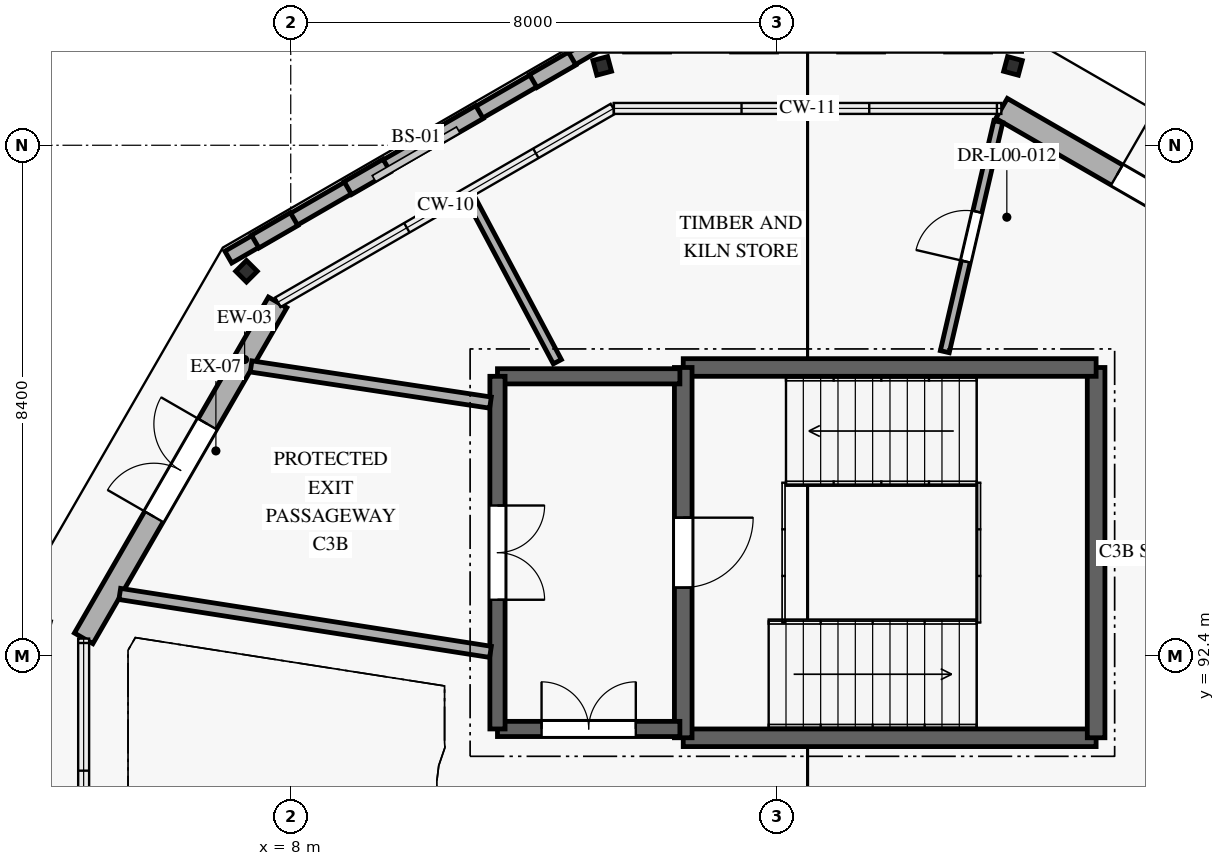
"""IFC4 building model, lengths in metres.
Left out: names, types, materials, properties, quantities, classifications, styles, units other than length and angle.
Written with IfcOpenShell. Run it as: python <this file> out.ifc"""

import sys

from ifc_helpers import new_model, si_unit, direction, frame, frame_2d, origin, origin_2d, place, context, subcontext, project, spatial, rectangle, hollow_rectangle, extrude, element, fill, save


model = new_model("IFC4")
c1 = context("Model", 3, precision=1e-05, world=origin(), true_north=direction((0.0, 1.0)))
c2 = subcontext(c1, "Body", "Model", "MODEL_VIEW")
j1 = project(units=[si_unit("LENGTHUNIT", "METRE"), si_unit("PLANEANGLEUNIT", "RADIAN")], contexts=[c1])
p1 = place(None, origin())
s1 = spatial("IfcSite", under=j1, at=p1, CompositionType="ELEMENT")
p2 = place(p1, origin())
s2 = spatial("IfcBuilding", under=s1, at=p2, CompositionType="ELEMENT")
p3 = place(p2, origin())
s3 = spatial("IfcBuildingStorey", under=s2, at=p3, CompositionType="ELEMENT", Elevation=0.0)
for number, where, z_axis, x_axis in (
    (1, (19.878, 102.105, 0.0), (0.0, 0.0, 1.0), (-0.966, 0.259, 0.0)),
    (2, (13.122, 102.105, 0.0), (0.0, 0.0, 1.0), (-0.966, -0.259, 0.0)),
    (3, (7.272, 98.728, 0.0), (0.0, 0.0, 1.0), (-0.707, -0.707, 0.0)),
):
    element("IfcColumn", number, at=place(p3, frame(where, z_axis=z_axis, x_axis=x_axis)), inside=s3, PredefinedType="COLUMN", context=c2, shape_type="SweptSolid", body=[
        extrude(hollow_rectangle(XDim=0.25, YDim=0.25, WallThickness=0.012, InnerFilletRadius=0.012, OuterFilletRadius=0.019, at=origin_2d()), origin(), (0.0, 0.0, 1.0), 4.2),
    ])
p4 = place(p3, frame((4.594, 92.69, 0.0), z_axis=(0.0, 0.0, 1.0), x_axis=(0.499966461314, 0.866044766488, 0.0)))
e4 = element("IfcWall", 4, at=p4, inside=s3, PredefinedType="SOLIDWALL", context=c2, shape_type="SweptSolid", body=[
    extrude(rectangle(XDim=6.38, YDim=0.35, at=frame_2d((3.19, 0.0))), origin(), (0.0, 0.0, 1.0), 3.94),
])
p5 = place(p4, frame((2.31, 0.0, 0.0)))
e5 = element("IfcOpeningElement", 5, at=p5, cuts=e4, PredefinedType="OPENING", context=c2, shape_type="SweptSolid", body=[
    extrude(rectangle(XDim=1.76, YDim=2.15, at=frame_2d((0.88, 1.075))), frame((0.0, 0.185, 0.0), z_axis=(0.0, -1.0, 0.0), x_axis=(1.0, 0.0, 0.0)), (0.0, 0.0, 1.0), 0.37),
])
p6 = place(p3, frame((19.69, 101.406, 0.0), z_axis=(0.0, 0.0, 1.0), x_axis=(0.866044766488, -0.499966461314, 0.0)))
e6 = element("IfcWall", 6, at=p6, inside=s3, PredefinedType="SOLIDWALL", context=c2, shape_type="SweptSolid", body=[
    extrude(rectangle(XDim=6.38, YDim=0.38, at=frame_2d((3.19, 0.0))), origin(), (0.0, 0.0, 1.0), 3.94),
])
p7 = place(p6, frame((2.19, 0.0, 0.0)))
e7 = element("IfcOpeningElement", 7, at=p7, cuts=e6, PredefinedType="OPENING", context=c2, shape_type="SweptSolid", body=[
    extrude(rectangle(XDim=2.0, YDim=2.2, at=frame_2d((1.0, 1.1))), frame((0.0, 0.2, 0.0), z_axis=(0.0, -1.0, 0.0), x_axis=(1.0, 0.0, 0.0)), (0.0, 0.0, 1.0), 0.4),
])
p8 = place(p3, frame((13.07, 102.481, 0.0), z_axis=(0.0, 0.0, 1.0), x_axis=(-0.866019260715, -0.500010639957, 0.0)))
e8 = element("IfcWall", 8, at=p8, inside=s3, PredefinedType="ELEMENTEDWALL", context=c2, shape_type="SweptSolid", body=[
    extrude(rectangle(XDim=7.04, YDim=0.225, at=frame_2d((3.52, 0.0))), origin(), (0.0, 0.0, 1.0), 0.55),
])
p9 = place(p3, frame((12.628, 102.226, 0.55), z_axis=(0.0, 0.0, 1.0), x_axis=(-0.865915952323, -0.500189527592, 0.0)))
e9 = element("IfcWall", 9, at=p9, inside=s3, PredefinedType="ELEMENTEDWALL", context=c2, shape_type="SweptSolid", body=[
    extrude(rectangle(XDim=0.739, YDim=0.245, at=frame_2d((0.37, 0.0))), origin(), (0.0, 0.0, 1.0), 3.39),
])
p10 = place(p3, frame((11.104, 101.345, 0.55), z_axis=(0.0, 0.0, 1.0), x_axis=(-0.866059033742, -0.499941746681, 0.0)))
e10 = element("IfcWall", 10, at=p10, inside=s3, PredefinedType="ELEMENTEDWALL", context=c2, shape_type="SweptSolid", body=[
    extrude(rectangle(XDim=0.739, YDim=0.245, at=frame_2d((0.369, 0.0))), origin(), (0.0, 0.0, 1.0), 3.39),
])
for number, where, z_axis, x_axis in (
    (11, (9.58, 100.466, 0.55), (0.0, 0.0, 1.0), (-0.866, -0.5, 0.0)),
    (12, (8.055, 99.585, 0.55), (0.0, 0.0, 1.0), (-0.866, -0.5, 0.0)),
):
    element("IfcWall", number, at=place(p3, frame(where, z_axis=z_axis, x_axis=x_axis)), inside=s3, PredefinedType="ELEMENTEDWALL", context=c2, shape_type="SweptSolid", body=[
        extrude(rectangle(XDim=0.739, YDim=0.245, at=frame_2d((0.37, 0.0))), origin(), (0.0, 0.0, 1.0), 3.39),
    ])
p11 = place(p3, frame((14.455, 91.055, 0.0), z_axis=(0.0, 0.0, 1.0), x_axis=(1.0, 0.0, 0.0)))
e13 = element("IfcWall", 13, at=p11, inside=s3, PredefinedType="SHEAR", context=c2, shape_type="SweptSolid", body=[
    extrude(rectangle(XDim=6.79, YDim=0.29, at=frame_2d((3.395, 0.0))), origin(), (0.0, 0.0, 1.0), 3.95),
])
p12 = place(p3, frame((21.245, 91.055, 0.0), z_axis=(0.0, 0.0, 1.0), x_axis=(0.0, 1.0, 0.0)))
e14 = element("IfcWall", 14, at=p12, inside=s3, PredefinedType="SHEAR", context=c2, shape_type="SweptSolid", body=[
    extrude(rectangle(XDim=6.09, YDim=0.29, at=frame_2d((3.045, 0.0))), origin(), (0.0, 0.0, 1.0), 3.95),
])
p13 = place(p3, frame((21.245, 97.145, 0.0), z_axis=(0.0, 0.0, 1.0), x_axis=(-1.0, 0.0, 0.0)))
e15 = element("IfcWall", 15, at=p13, inside=s3, PredefinedType="SHEAR", context=c2, shape_type="SweptSolid", body=[
    extrude(rectangle(XDim=6.79, YDim=0.29, at=frame_2d((3.395, 0.0))), origin(), (0.0, 0.0, 1.0), 3.95),
])
p14 = place(p3, frame((14.455, 97.145, 0.0), z_axis=(0.0, 0.0, 1.0), x_axis=(0.0, -1.0, 0.0)))
e16 = element("IfcWall", 16, at=p14, inside=s3, PredefinedType="SHEAR", context=c2, shape_type="SweptSolid", body=[
    extrude(rectangle(XDim=6.09, YDim=0.29, at=frame_2d((3.045, 0.0))), origin(), (0.0, 0.0, 1.0), 3.95),
])
p15 = place(p14, frame((2.47, 0.0, 0.0)))
e17 = element("IfcOpeningElement", 17, at=p15, cuts=e16, PredefinedType="OPENING", context=c2, shape_type="SweptSolid", body=[
    extrude(rectangle(XDim=1.15, YDim=2.1, at=frame_2d((0.575, 1.05))), frame((0.0, 0.155, 0.0), z_axis=(0.0, -1.0, 0.0), x_axis=(1.0, 0.0, 0.0)), (0.0, 0.0, 1.0), 0.31),
])
p16 = place(p3, frame((11.4, 91.2, 0.0), z_axis=(0.0, 0.0, 1.0), x_axis=(1.0, 0.0, 0.0)))
e18 = element("IfcWall", 18, at=p16, inside=s3, PredefinedType="SHEAR", context=c2, shape_type="SweptSolid", body=[
    extrude(rectangle(XDim=3.0, YDim=0.25, at=frame_2d((1.5, 0.0))), origin(), (0.0, 0.0, 1.0), 3.95),
])
p17 = place(p16, frame((0.725, 0.0, 0.0)))
e19 = element("IfcOpeningElement", 19, at=p17, cuts=e18, PredefinedType="OPENING", context=c2, shape_type="SweptSolid", body=[
    extrude(rectangle(XDim=1.55, YDim=2.15, at=frame_2d((0.775, 1.075))), frame((0.0, 0.135, 0.0), z_axis=(0.0, -1.0, 0.0), x_axis=(1.0, 0.0, 0.0)), (0.0, 0.0, 1.0), 0.27),
])
p18 = place(p3, frame((14.4, 97.0, 0.0), z_axis=(0.0, 0.0, 1.0), x_axis=(-1.0, 0.0, 0.0)))
e20 = element("IfcWall", 20, at=p18, inside=s3, PredefinedType="SHEAR", context=c2, shape_type="SweptSolid", body=[
    extrude(rectangle(XDim=3.0, YDim=0.25, at=frame_2d((1.5, 0.0))), origin(), (0.0, 0.0, 1.0), 3.95),
])
p19 = place(p3, frame((11.4, 97.0, 0.0), z_axis=(0.0, 0.0, 1.0), x_axis=(0.0, -1.0, 0.0)))
e21 = element("IfcWall", 21, at=p19, inside=s3, PredefinedType="SHEAR", context=c2, shape_type="SweptSolid", body=[
    extrude(rectangle(XDim=5.8, YDim=0.25, at=frame_2d((2.9, 0.0))), origin(), (0.0, 0.0, 1.0), 3.95),
])
p20 = place(p19, frame((2.125, 0.0, 0.0)))
e22 = element("IfcOpeningElement", 22, at=p20, cuts=e21, PredefinedType="OPENING", context=c2, shape_type="SweptSolid", body=[
    extrude(rectangle(XDim=1.55, YDim=2.15, at=frame_2d((0.775, 1.075))), frame((0.0, 0.135, 0.0), z_axis=(0.0, -1.0, 0.0), x_axis=(1.0, 0.0, 0.0)), (0.0, 0.0, 1.0), 0.27),
])
p21 = place(p3, frame((11.285, 96.567, 0.0), z_axis=(0.0, 0.0, 1.0), x_axis=(-0.988761147225, 0.149503825163, 0.0)))
e23 = element("IfcWall", 23, at=p21, inside=s3, PredefinedType="PARTITIONING", context=c2, shape_type="SweptSolid", body=[
    extrude(rectangle(XDim=3.981, YDim=0.185, at=frame_2d((1.991, 0.0))), origin(), (0.0, 0.0, 1.0), 3.915),
])
p22 = place(p3, frame((5.188, 93.421, 0.0), z_axis=(0.0, 0.0, 1.0), x_axis=(0.988012222326, -0.154375673388, 0.0)))
e24 = element("IfcWall", 24, at=p22, inside=s3, PredefinedType="PARTITIONING", context=c2, shape_type="SweptSolid", body=[
    extrude(rectangle(XDim=6.171, YDim=0.185, at=frame_2d((3.085, 0.0))), origin(), (0.0, 0.0, 1.0), 3.915),
])
p23 = place(p3, frame((18.757, 97.405, 0.0), z_axis=(0.0, 0.0, 1.0), x_axis=(0.226575893186, 0.973993513647, 0.0)))
e25 = element("IfcWall", 25, at=p23, inside=s3, PredefinedType="PARTITIONING", context=c2, shape_type="SweptSolid", body=[
    extrude(rectangle(XDim=3.885, YDim=0.15, at=frame_2d((1.942, 0.0))), origin(), (0.0, 0.0, 1.0), 3.915),
])
p24 = place(p23, frame((1.522, 0.0, 0.0)))
e26 = element("IfcOpeningElement", 26, at=p24, cuts=e25, PredefinedType="OPENING", context=c2, shape_type="SweptSolid", body=[
    extrude(rectangle(XDim=0.84, YDim=2.04, at=frame_2d((0.42, 1.02))), frame((0.0, 0.085, 0.0), z_axis=(0.0, -1.0, 0.0), x_axis=(1.0, 0.0, 0.0)), (0.0, 0.0, 1.0), 0.17),
])
p25 = place(p3, frame((10.954, 99.93, 0.0), z_axis=(0.0, 0.0, 1.0), x_axis=(0.469477420604, -0.882944478177, 0.0)))
e27 = element("IfcWall", 27, at=p25, inside=s3, PredefinedType="PARTITIONING", context=c2, shape_type="SweptSolid", body=[
    extrude(rectangle(XDim=3.047, YDim=0.15, at=frame_2d((1.523, 0.0))), origin(), (0.0, 0.0, 1.0), 3.915),
])
p26 = place(p5, origin())
e28 = element("IfcDoor", 28, at=p26, inside=s3, OperationType="DOUBLE_DOOR_SINGLE_SWING", PredefinedType="DOOR", context=c2, shape_type="SweptSolid", body=[
    extrude(rectangle(XDim=1.76, YDim=2.15, at=frame_2d((0.88, 1.075))), frame((0.0, 0.025, 0.0), z_axis=(0.0, -1.0, 0.0), x_axis=(1.0, 0.0, 0.0)), (0.0, 0.0, 1.0), 0.05),
])
fill(e5, e28)
p27 = place(p7, origin())
e29 = element("IfcDoor", 29, at=p27, inside=s3, OperationType="DOUBLE_DOOR_SINGLE_SWING", PredefinedType="DOOR", context=c2, shape_type="SweptSolid", body=[
    extrude(rectangle(XDim=2.0, YDim=2.2, at=frame_2d((1.0, 1.1))), frame((0.0, 0.025, 0.0), z_axis=(0.0, -1.0, 0.0), x_axis=(1.0, 0.0, 0.0)), (0.0, 0.0, 1.0), 0.05),
])
fill(e7, e29)
p28 = place(p15, frame((1.15, 0.0, 0.0), z_axis=(0.0, 0.0, 1.0), x_axis=(-1.0, 0.0, 0.0)))
e30 = element("IfcDoor", 30, at=p28, inside=s3, OperationType="SINGLE_SWING_LEFT", PredefinedType="DOOR", context=c2, shape_type="SweptSolid", body=[
    extrude(rectangle(XDim=1.15, YDim=2.1, at=frame_2d((0.575, 1.05))), frame((0.0, 0.025, 0.0), z_axis=(0.0, -1.0, 0.0), x_axis=(1.0, 0.0, 0.0)), (0.0, 0.0, 1.0), 0.05),
])
fill(e17, e30)
p29 = place(p17, frame((1.55, 0.0, 0.0), z_axis=(0.0, 0.0, 1.0), x_axis=(-1.0, 0.0, 0.0)))
e31 = element("IfcDoor", 31, at=p29, inside=s3, OperationType="DOUBLE_DOOR_SINGLE_SWING", PredefinedType="DOOR", context=c2, shape_type="SweptSolid", body=[
    extrude(rectangle(XDim=1.55, YDim=2.15, at=frame_2d((0.775, 1.075))), frame((0.0, 0.025, 0.0), z_axis=(0.0, -1.0, 0.0), x_axis=(1.0, 0.0, 0.0)), (0.0, 0.0, 1.0), 0.05),
])
fill(e19, e31)
p30 = place(p20, frame((1.55, 0.0, 0.0), z_axis=(0.0, 0.0, 1.0), x_axis=(-1.0, 0.0, 0.0)))
e32 = element("IfcDoor", 32, at=p30, inside=s3, OperationType="DOUBLE_DOOR_SINGLE_SWING", PredefinedType="DOOR", context=c2, shape_type="SweptSolid", body=[
    extrude(rectangle(XDim=1.55, YDim=2.15, at=frame_2d((0.775, 1.075))), frame((0.0, 0.025, 0.0), z_axis=(0.0, -1.0, 0.0), x_axis=(1.0, 0.0, 0.0)), (0.0, 0.0, 1.0), 0.05),
])
fill(e22, e32)
p31 = place(p24, origin())
e33 = element("IfcDoor", 33, at=p31, inside=s3, OperationType="SINGLE_SWING_LEFT", PredefinedType="DOOR", context=c2, shape_type="SweptSolid", body=[
    extrude(rectangle(XDim=0.84, YDim=2.04, at=frame_2d((0.42, 1.02))), frame((0.0, 0.025, 0.0), z_axis=(0.0, -1.0, 0.0), x_axis=(1.0, 0.0, 0.0)), (0.0, 0.0, 1.0), 0.05),
])
fill(e26, e33)
save(model, sys.argv[1])
